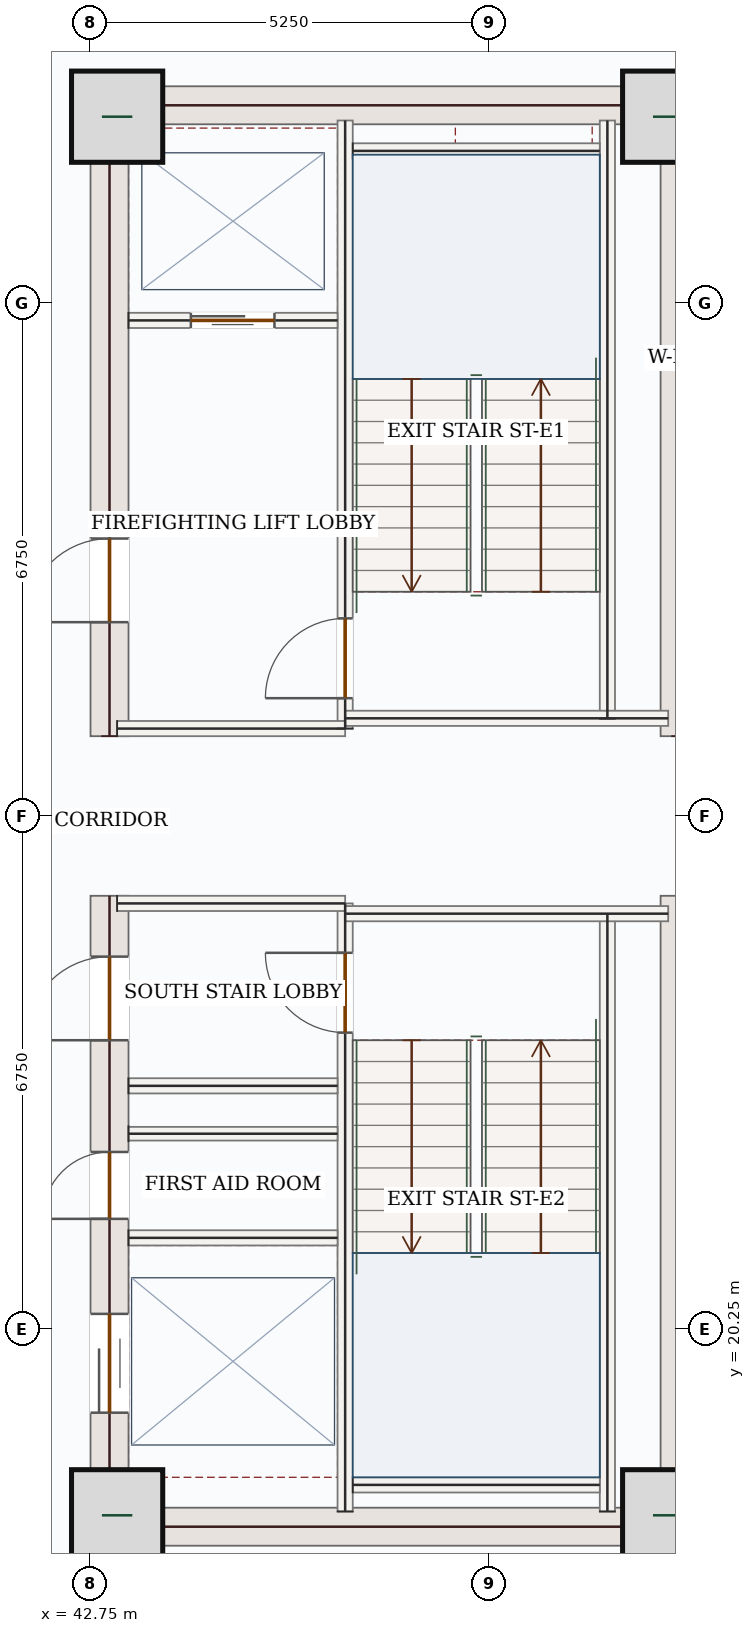
"""IFC4 building model, lengths in metres.
Left out: names, types, materials, properties, quantities, classifications, styles, units other than length and angle.
Written with IfcOpenShell. Run it as: python <this file> out.ifc"""

import sys

from ifc_helpers import new_model, si_unit, direction, frame, frame_2d, origin, origin_2d, place, context, subcontext, project, spatial, rectangle, extrude, source, transform, mapped, element, fill, save


model = new_model("IFC4")
c1 = context("Model", 3, precision=1e-05, world=origin(), true_north=direction((0.0, 1.0)))
c2 = subcontext(c1, "Body", "Model", "MODEL_VIEW")
j1 = project(units=[si_unit("LENGTHUNIT", "METRE"), si_unit("PLANEANGLEUNIT", "RADIAN")], contexts=[c1])
p1 = place(None, origin())
s1 = spatial("IfcSite", under=j1, at=p1, CompositionType="ELEMENT")
p2 = place(p1, origin())
s2 = spatial("IfcBuilding", under=s1, at=p2, CompositionType="ELEMENT")
p3 = place(p2, frame((0.0, 0.0, 205.8)))
s3 = spatial("IfcBuildingStorey", under=s2, at=p3, CompositionType="ELEMENT", Elevation=205.8)
p4 = place(p3, frame((43.0, 17.4, 0.0), z_axis=(0.0, 0.0, 1.0), x_axis=(0.0, 1.0, 0.0)))
e1 = element("IfcWall", 1, at=p4, inside=s3, PredefinedType="SHEAR", context=c2, shape_type="SweptSolid", body=[
    extrude(rectangle(XDim=8.55, YDim=0.5, at=frame_2d((4.275, 0.0))), origin(), (0.0, 0.0, 1.0), 3.62),
])
p5 = place(p4, frame((6.65, 0.0, 0.0)))
e2 = element("IfcOpeningElement", 2, at=p5, cuts=e1, PredefinedType="OPENING", context=c2, shape_type="SweptSolid", body=[
    extrude(rectangle(XDim=1.1, YDim=2.2, at=frame_2d((0.55, 1.1))), frame((0.0, 0.26, 0.0), z_axis=(0.0, -1.0, 0.0), x_axis=(1.0, 0.0, 0.0)), (0.0, 0.0, 1.0), 0.52),
])
p6 = place(p4, frame((1.75, 0.0, 0.0)))
e3 = element("IfcOpeningElement", 3, at=p6, cuts=e1, PredefinedType="OPENING", context=c2, shape_type="SweptSolid", body=[
    extrude(rectangle(XDim=1.3, YDim=2.2, at=frame_2d((0.65, 1.1))), frame((0.0, 0.26, 0.0), z_axis=(0.0, -1.0, 0.0), x_axis=(1.0, 0.0, 0.0)), (0.0, 0.0, 1.0), 0.52),
])
p7 = place(p4, frame((4.3, 0.0, 0.0)))
e4 = element("IfcOpeningElement", 4, at=p7, cuts=e1, PredefinedType="OPENING", context=c2, shape_type="SweptSolid", body=[
    extrude(rectangle(XDim=0.88, YDim=2.1, at=frame_2d((0.44, 1.05))), frame((0.0, 0.26, 0.0), z_axis=(0.0, -1.0, 0.0), x_axis=(1.0, 0.0, 0.0)), (0.0, 0.0, 1.0), 0.52),
])
p8 = place(p3, frame((43.0, 28.05, 0.0), z_axis=(0.0, 0.0, 1.0), x_axis=(0.0, 1.0, 0.0)))
e5 = element("IfcWall", 5, at=p8, inside=s3, PredefinedType="SHEAR", context=c2, shape_type="SweptSolid", body=[
    extrude(rectangle(XDim=8.55, YDim=0.5, at=frame_2d((4.275, 0.0))), origin(), (0.0, 0.0, 1.0), 3.62),
])
p9 = place(p8, frame((1.5, 0.0, 0.0)))
e6 = element("IfcOpeningElement", 6, at=p9, cuts=e5, PredefinedType="OPENING", context=c2, shape_type="SweptSolid", body=[
    extrude(rectangle(XDim=1.1, YDim=2.2, at=frame_2d((0.55, 1.1))), frame((0.0, 0.26, 0.0), z_axis=(0.0, -1.0, 0.0), x_axis=(1.0, 0.0, 0.0)), (0.0, 0.0, 1.0), 0.52),
])
m1 = source(origin(), c2, "Body", "SweptSolid", [
    extrude(rectangle(XDim=8.55, YDim=0.5, at=frame_2d((4.275, 0.0))), origin(), (0.0, 0.0, 1.0), 3.62),
])
for number, where, z_axis, x_axis in (
    (7, (50.5, 17.4, 0.0), (0.0, 0.0, 1.0), (0.0, 1.0, 0.0)),
    (8, (50.5, 28.05, 0.0), (0.0, 0.0, 1.0), (0.0, 1.0, 0.0)),
):
    element("IfcWall", number, at=place(p3, frame(where, z_axis=z_axis, x_axis=x_axis)), inside=s3, PredefinedType="SHEAR", context=c2, shape_type="MappedRepresentation", body=[
        mapped(m1, transform((0.0, 0.0, 0.0), x_axis=(1.0, 0.0, 0.0), y_axis=(0.0, 1.0, 0.0), z_axis=(0.0, 0.0, 1.0), scale=1.0)),
    ])
m2 = source(origin(), c2, "Body", "SweptSolid", [
    extrude(rectangle(XDim=7.0, YDim=0.5, at=frame_2d((3.5, 0.0))), origin(), (0.0, 0.0, 1.0), 3.62),
])
for number, where, z_axis, x_axis in (
    (9, (43.25, 17.65, 0.0), (0.0, 0.0, 1.0), (1.0, 0.0, 0.0)),
    (10, (43.25, 36.35, 0.0), (0.0, 0.0, 1.0), (1.0, 0.0, 0.0)),
):
    element("IfcWall", number, at=place(p3, frame(where, z_axis=z_axis, x_axis=x_axis)), inside=s3, PredefinedType="SHEAR", context=c2, shape_type="MappedRepresentation", body=[
        mapped(m2, transform((0.0, 0.0, 0.0), x_axis=(1.0, 0.0, 0.0), y_axis=(0.0, 1.0, 0.0), z_axis=(0.0, 0.0, 1.0), scale=1.0)),
    ])
m3 = source(origin(), c2, "Body", "SweptSolid", [
    extrude(rectangle(XDim=1.2, YDim=1.2, at=origin_2d()), origin(), (0.0, 0.0, 1.0), 3.9),
])
for number, where, z_axis, x_axis in (
    (11, (43.1, 17.8, 0.0), (0.0, 0.0, 1.0), (1.0, 0.0, 0.0)),
    (12, (50.35, 17.8, 0.0), (0.0, 0.0, 1.0), (1.0, 0.0, 0.0)),
    (13, (43.1, 36.2, 0.0), (0.0, 0.0, 1.0), (1.0, 0.0, 0.0)),
    (14, (50.35, 36.2, 0.0), (0.0, 0.0, 1.0), (1.0, 0.0, 0.0)),
):
    element("IfcColumn", number, at=place(p3, frame(where, z_axis=z_axis, x_axis=x_axis)), inside=s3, PredefinedType="COLUMN", context=c2, shape_type="MappedRepresentation", body=[
        mapped(m3, transform((0.0, 0.0, 0.0), x_axis=(1.0, 0.0, 0.0), y_axis=(0.0, 1.0, 0.0), z_axis=(0.0, 0.0, 1.0), scale=1.0)),
    ])
m4 = source(origin(), c2, "Body", "SweptSolid", [
    extrude(rectangle(XDim=5.258, YDim=0.28, at=frame_2d((2.629, 0.0))), origin(), (0.0, 0.0, 1.0), 3.62),
])
p10 = place(p3, frame((53.06, 18.458, 0.0), z_axis=(0.0, 0.0, 1.0), x_axis=(-0.707106781187, -0.707106781187, 0.0)))
e15 = element("IfcWall", 15, at=p10, inside=s3, PredefinedType="SOLIDWALL", context=c2, shape_type="MappedRepresentation", body=[
    mapped(m4, transform((0.0, 0.0, 0.0), x_axis=(1.0, 0.0, 0.0), y_axis=(0.0, 1.0, 0.0), z_axis=(0.0, 0.0, 1.0), scale=1.0)),
])
m5 = source(origin(), c2, "Body", "SweptSolid", [
    extrude(rectangle(XDim=7.87, YDim=0.2, at=frame_2d((3.935, 0.0))), origin(), (0.0, 0.0, 1.0), 3.62),
])
for number, where, z_axis, x_axis in (
    (16, (49.55, 17.85, 0.0), (0.0, 0.0, 1.0), (0.0, 1.0, 0.0)),
    (17, (49.55, 28.28, 0.0), (0.0, 0.0, 1.0), (0.0, 1.0, 0.0)),
):
    element("IfcWall", number, at=place(p3, frame(where, z_axis=z_axis, x_axis=x_axis)), inside=s3, PredefinedType="SOLIDWALL", context=c2, shape_type="MappedRepresentation", body=[
        mapped(m5, transform((0.0, 0.0, 0.0), x_axis=(1.0, 0.0, 0.0), y_axis=(0.0, 1.0, 0.0), z_axis=(0.0, 0.0, 1.0), scale=1.0)),
    ])
p11 = place(p3, frame((46.1, 17.85, 0.0), z_axis=(0.0, 0.0, 1.0), x_axis=(0.0, 1.0, 0.0)))
e18 = element("IfcWall", 18, at=p11, inside=s3, PredefinedType="SOLIDWALL", context=c2, shape_type="SweptSolid", body=[
    extrude(rectangle(XDim=8.0, YDim=0.2, at=frame_2d((4.0, 0.0))), origin(), (0.0, 0.0, 1.0), 3.62),
])
p12 = place(p11, frame((6.3, 0.0, 0.0)))
e19 = element("IfcOpeningElement", 19, at=p12, cuts=e18, PredefinedType="OPENING", context=c2, shape_type="SweptSolid", body=[
    extrude(rectangle(XDim=1.05, YDim=2.15, at=frame_2d((0.525, 1.075))), frame((0.0, 0.11, 0.0), z_axis=(0.0, -1.0, 0.0), x_axis=(1.0, 0.0, 0.0)), (0.0, 0.0, 1.0), 0.22),
])
p13 = place(p3, frame((46.1, 28.15, 0.0), z_axis=(0.0, 0.0, 1.0), x_axis=(0.0, 1.0, 0.0)))
e20 = element("IfcWall", 20, at=p13, inside=s3, PredefinedType="SOLIDWALL", context=c2, shape_type="SweptSolid", body=[
    extrude(rectangle(XDim=8.0, YDim=0.2, at=frame_2d((4.0, 0.0))), origin(), (0.0, 0.0, 1.0), 3.62),
])
p14 = place(p13, frame((0.4, 0.0, 0.0)))
e21 = element("IfcOpeningElement", 21, at=p14, cuts=e20, PredefinedType="OPENING", context=c2, shape_type="SweptSolid", body=[
    extrude(rectangle(XDim=1.05, YDim=2.15, at=frame_2d((0.525, 1.075))), frame((0.0, 0.11, 0.0), z_axis=(0.0, -1.0, 0.0), x_axis=(1.0, 0.0, 0.0)), (0.0, 0.0, 1.0), 0.22),
])
m6 = source(origin(), c2, "Body", "SweptSolid", [
    extrude(rectangle(XDim=3.0, YDim=0.2, at=frame_2d((1.5, 0.0))), origin(), (0.0, 0.0, 1.0), 3.62),
])
p15 = place(p3, frame((43.1, 25.85, 0.0), z_axis=(0.0, 0.0, 1.0), x_axis=(1.0, 0.0, 0.0)))
e22 = element("IfcWall", 22, at=p15, inside=s3, PredefinedType="SOLIDWALL", context=c2, shape_type="MappedRepresentation", body=[
    mapped(m6, transform((0.0, 0.0, 0.0), x_axis=(1.0, 0.0, 0.0), y_axis=(0.0, 1.0, 0.0), z_axis=(0.0, 0.0, 1.0), scale=1.0)),
])
m7 = source(origin(), c2, "Body", "SweptSolid", [
    extrude(rectangle(XDim=4.25, YDim=0.2, at=frame_2d((2.125, 0.0))), origin(), (0.0, 0.0, 1.0), 3.62),
])
p16 = place(p3, frame((46.1, 25.715, 0.0), z_axis=(0.0, 0.0, 1.0), x_axis=(1.0, 0.0, 0.0)))
e23 = element("IfcWall", 23, at=p16, inside=s3, PredefinedType="SOLIDWALL", context=c2, shape_type="MappedRepresentation", body=[
    mapped(m7, transform((0.0, 0.0, 0.0), x_axis=(1.0, 0.0, 0.0), y_axis=(0.0, 1.0, 0.0), z_axis=(0.0, 0.0, 1.0), scale=1.0)),
])
p17 = place(p3, frame((43.1, 28.15, 0.0), z_axis=(0.0, 0.0, 1.0), x_axis=(1.0, 0.0, 0.0)))
e24 = element("IfcWall", 24, at=p17, inside=s3, PredefinedType="SOLIDWALL", context=c2, shape_type="MappedRepresentation", body=[
    mapped(m6, transform((0.0, 0.0, 0.0), x_axis=(1.0, 0.0, 0.0), y_axis=(0.0, 1.0, 0.0), z_axis=(0.0, 0.0, 1.0), scale=1.0)),
])
p18 = place(p3, frame((46.1, 28.285, 0.0), z_axis=(0.0, 0.0, 1.0), x_axis=(1.0, 0.0, 0.0)))
e25 = element("IfcWall", 25, at=p18, inside=s3, PredefinedType="SOLIDWALL", context=c2, shape_type="MappedRepresentation", body=[
    mapped(m7, transform((0.0, 0.0, 0.0), x_axis=(1.0, 0.0, 0.0), y_axis=(0.0, 1.0, 0.0), z_axis=(0.0, 0.0, 1.0), scale=1.0)),
])
m8 = source(origin(), c2, "Body", "SweptSolid", [
    extrude(rectangle(XDim=3.25, YDim=0.2, at=frame_2d((1.625, 0.0))), origin(), (0.0, 0.0, 1.0), 3.62),
])
for number, where, z_axis, x_axis in (
    (26, (46.2, 35.75, 0.0), (0.0, 0.0, 1.0), (1.0, 0.0, 0.0)),
    (27, (46.2, 18.2, 0.0), (0.0, 0.0, 1.0), (1.0, 0.0, 0.0)),
):
    element("IfcWall", number, at=place(p3, frame(where, z_axis=z_axis, x_axis=x_axis)), inside=s3, PredefinedType="SOLIDWALL", context=c2, shape_type="MappedRepresentation", body=[
        mapped(m8, transform((0.0, 0.0, 0.0), x_axis=(1.0, 0.0, 0.0), y_axis=(0.0, 1.0, 0.0), z_axis=(0.0, 0.0, 1.0), scale=1.0)),
    ])
p19 = place(p3, frame((43.25, 33.52, 0.0), z_axis=(0.0, 0.0, 1.0), x_axis=(1.0, 0.0, 0.0)))
e28 = element("IfcWall", 28, at=p19, inside=s3, PredefinedType="SOLIDWALL", context=c2, shape_type="SweptSolid", body=[
    extrude(rectangle(XDim=2.75, YDim=0.2, at=frame_2d((1.375, 0.0))), origin(), (0.0, 0.0, 1.0), 3.62),
])
p20 = place(p19, frame((0.82, 0.0, 0.0)))
e29 = element("IfcOpeningElement", 29, at=p20, cuts=e28, PredefinedType="OPENING", context=c2, shape_type="SweptSolid", body=[
    extrude(rectangle(XDim=1.1, YDim=2.15, at=frame_2d((0.55, 1.075))), frame((0.0, 0.11, 0.0), z_axis=(0.0, -1.0, 0.0), x_axis=(1.0, 0.0, 0.0)), (0.0, 0.0, 1.0), 0.22),
])
m9 = source(origin(), c2, "Body", "SweptSolid", [
    extrude(rectangle(XDim=2.75, YDim=0.2, at=frame_2d((1.375, 0.0))), origin(), (0.0, 0.0, 1.0), 3.62),
])
for number, where, z_axis, x_axis in (
    (30, (43.25, 23.45, 0.0), (0.0, 0.0, 1.0), (1.0, 0.0, 0.0)),
    (31, (43.25, 21.45, 0.0), (0.0, 0.0, 1.0), (1.0, 0.0, 0.0)),
):
    element("IfcWall", number, at=place(p3, frame(where, z_axis=z_axis, x_axis=x_axis)), inside=s3, PredefinedType="SOLIDWALL", context=c2, shape_type="MappedRepresentation", body=[
        mapped(m9, transform((0.0, 0.0, 0.0), x_axis=(1.0, 0.0, 0.0), y_axis=(0.0, 1.0, 0.0), z_axis=(0.0, 0.0, 1.0), scale=1.0)),
    ])
m10 = source(origin(), c2, "Body", "SweptSolid", [
    extrude(rectangle(XDim=2.75, YDim=0.18, at=frame_2d((1.375, 0.0))), origin(), (0.0, 0.0, 1.0), 3.62),
])
p21 = place(p3, frame((43.25, 22.82, 0.0), z_axis=(0.0, 0.0, 1.0), x_axis=(1.0, 0.0, 0.0)))
e32 = element("IfcWall", 32, at=p21, inside=s3, PredefinedType="PARTITIONING", context=c2, shape_type="MappedRepresentation", body=[
    mapped(m10, transform((0.0, 0.0, 0.0), x_axis=(1.0, 0.0, 0.0), y_axis=(0.0, 1.0, 0.0), z_axis=(0.0, 0.0, 1.0), scale=1.0)),
])
m11 = source(origin(), c2, "Body", "SweptSolid", [
    extrude(rectangle(XDim=1.05, YDim=2.15, at=frame_2d((0.525, 1.075))), frame((0.0, 0.025, 0.0), z_axis=(0.0, -1.0, 0.0), x_axis=(1.0, 0.0, 0.0)), (0.0, 0.0, 1.0), 0.05),
])
p22 = place(p14, origin())
e33 = element("IfcDoor", 33, at=p22, inside=s3, OperationType="SINGLE_SWING_LEFT", PredefinedType="DOOR", context=c2, shape_type="MappedRepresentation", body=[
    mapped(m11, transform((0.0, 0.0, 0.0), x_axis=(1.0, 0.0, 0.0), y_axis=(0.0, 1.0, 0.0), z_axis=(0.0, 0.0, 1.0), scale=1.0)),
])
fill(e21, e33)
p23 = place(p12, origin())
e34 = element("IfcDoor", 34, at=p23, inside=s3, OperationType="SINGLE_SWING_RIGHT", PredefinedType="DOOR", context=c2, shape_type="MappedRepresentation", body=[
    mapped(m11, transform((0.0, 0.0, 0.0), x_axis=(1.0, 0.0, 0.0), y_axis=(0.0, 1.0, 0.0), z_axis=(0.0, 0.0, 1.0), scale=1.0)),
])
fill(e19, e34)
m12 = source(origin(), c2, "Body", "SweptSolid", [
    extrude(rectangle(XDim=1.1, YDim=2.15, at=frame_2d((0.55, 1.075))), frame((0.0, 0.025, 0.0), z_axis=(0.0, -1.0, 0.0), x_axis=(1.0, 0.0, 0.0)), (0.0, 0.0, 1.0), 0.05),
])
p24 = place(p20, origin())
e35 = element("IfcDoor", 35, at=p24, inside=s3, OperationType="DOUBLE_DOOR_SLIDING", PredefinedType="DOOR", context=c2, shape_type="MappedRepresentation", body=[
    mapped(m12, transform((0.0, 0.0, 0.0), x_axis=(1.0, 0.0, 0.0), y_axis=(0.0, 1.0, 0.0), z_axis=(0.0, 0.0, 1.0), scale=1.0)),
])
fill(e29, e35)
m13 = source(origin(), c2, "Body", "SweptSolid", [
    extrude(rectangle(XDim=1.1, YDim=2.2, at=frame_2d((0.55, 1.1))), frame((0.0, 0.025, 0.0), z_axis=(0.0, -1.0, 0.0), x_axis=(1.0, 0.0, 0.0)), (0.0, 0.0, 1.0), 0.05),
])
p25 = place(p9, origin())
e36 = element("IfcDoor", 36, at=p25, inside=s3, OperationType="SINGLE_SWING_LEFT", PredefinedType="DOOR", context=c2, shape_type="MappedRepresentation", body=[
    mapped(m13, transform((0.0, 0.0, 0.0), x_axis=(1.0, 0.0, 0.0), y_axis=(0.0, 1.0, 0.0), z_axis=(0.0, 0.0, 1.0), scale=1.0)),
])
fill(e6, e36)
p26 = place(p5, origin())
e37 = element("IfcDoor", 37, at=p26, inside=s3, OperationType="SINGLE_SWING_LEFT", PredefinedType="DOOR", context=c2, shape_type="MappedRepresentation", body=[
    mapped(m13, transform((0.0, 0.0, 0.0), x_axis=(1.0, 0.0, 0.0), y_axis=(0.0, 1.0, 0.0), z_axis=(0.0, 0.0, 1.0), scale=1.0)),
])
fill(e2, e37)
m14 = source(origin(), c2, "Body", "SweptSolid", [
    extrude(rectangle(XDim=1.3, YDim=2.2, at=frame_2d((0.65, 1.1))), frame((0.0, 0.025, 0.0), z_axis=(0.0, -1.0, 0.0), x_axis=(1.0, 0.0, 0.0)), (0.0, 0.0, 1.0), 0.05),
])
p27 = place(p6, origin())
e38 = element("IfcDoor", 38, at=p27, inside=s3, OperationType="DOUBLE_DOOR_SLIDING", PredefinedType="DOOR", context=c2, shape_type="MappedRepresentation", body=[
    mapped(m14, transform((0.0, 0.0, 0.0), x_axis=(1.0, 0.0, 0.0), y_axis=(0.0, 1.0, 0.0), z_axis=(0.0, 0.0, 1.0), scale=1.0)),
])
fill(e3, e38)
m15 = source(origin(), c2, "Body", "SweptSolid", [
    extrude(rectangle(XDim=0.88, YDim=2.1, at=frame_2d((0.44, 1.05))), frame((0.0, 0.025, 0.0), z_axis=(0.0, -1.0, 0.0), x_axis=(1.0, 0.0, 0.0)), (0.0, 0.0, 1.0), 0.05),
])
p28 = place(p7, origin())
e39 = element("IfcDoor", 39, at=p28, inside=s3, OperationType="SINGLE_SWING_LEFT", PredefinedType="DOOR", context=c2, shape_type="MappedRepresentation", body=[
    mapped(m15, transform((0.0, 0.0, 0.0), x_axis=(1.0, 0.0, 0.0), y_axis=(0.0, 1.0, 0.0), z_axis=(0.0, 0.0, 1.0), scale=1.0)),
])
fill(e4, e39)
save(model, sys.argv[1])
